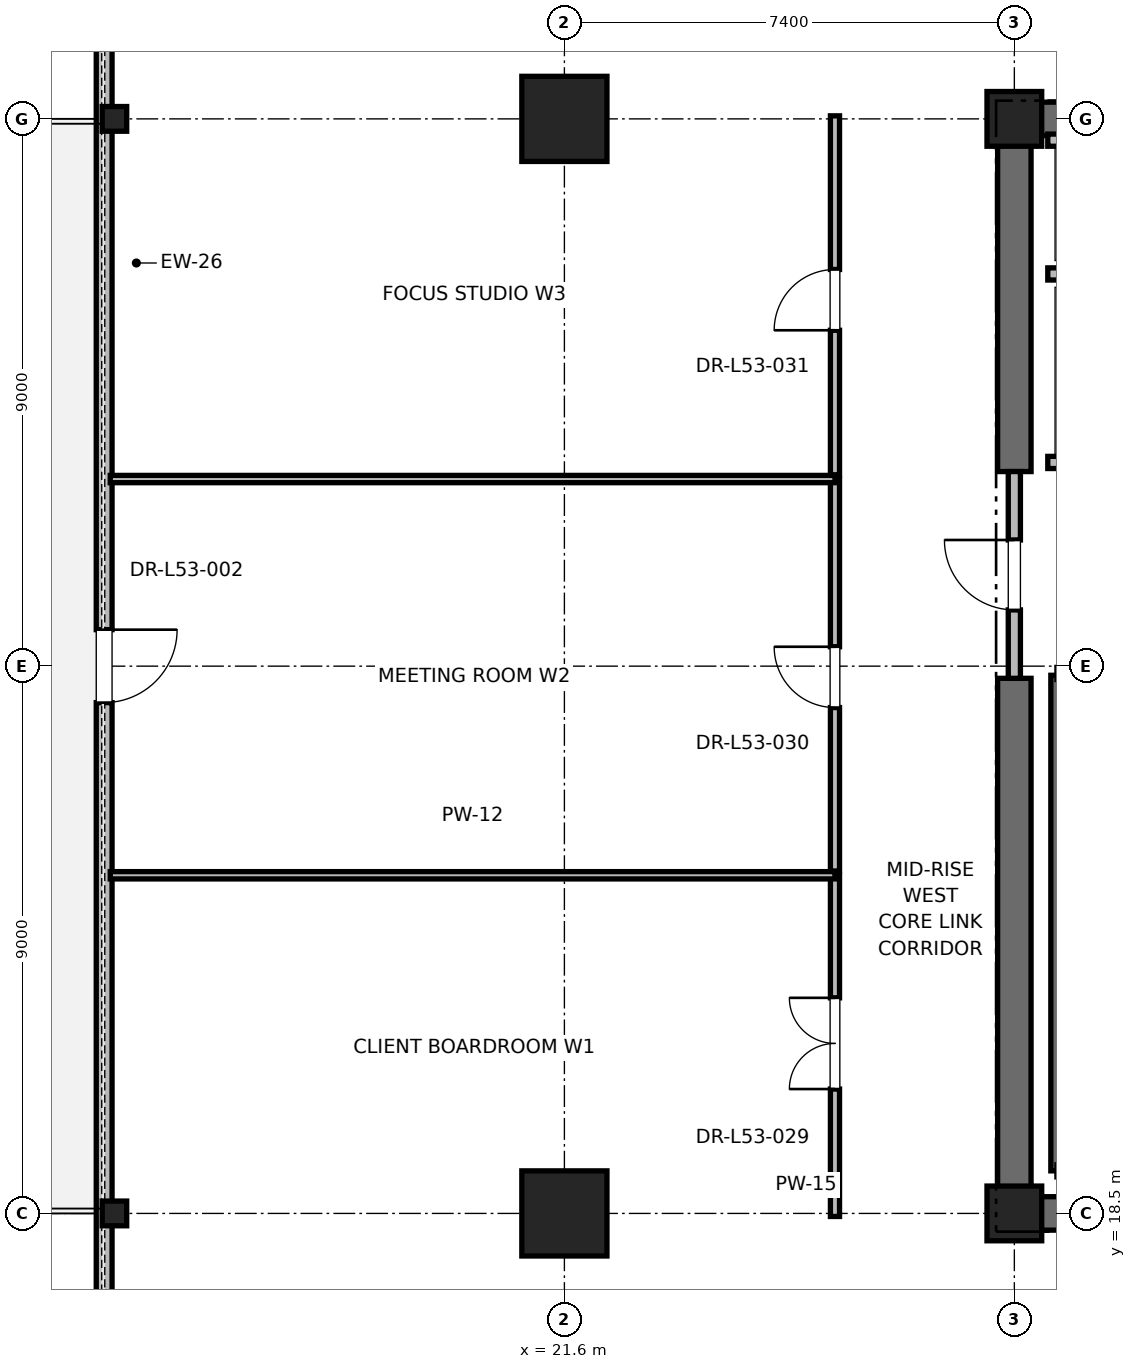
"""IFC4 building model, lengths in metres.
Left out: names, types, materials, properties, quantities, classifications, styles, units other than length and angle.
Written with IfcOpenShell. Run it as: python <this file> out.ifc"""

import sys

from ifc_helpers import new_model, si_unit, direction, frame, frame_2d, origin, origin_2d, place, context, subcontext, project, spatial, rectangle, i_section, extrude, element, fill, save


model = new_model("IFC4")
c1 = context("Model", 3, precision=1e-05, world=origin(), true_north=direction((0.0, 1.0)))
c2 = subcontext(c1, "Body", "Model", "MODEL_VIEW")
j1 = project(units=[si_unit("LENGTHUNIT", "METRE"), si_unit("PLANEANGLEUNIT", "RADIAN")], contexts=[c1])
p1 = place(None, origin())
s1 = spatial("IfcSite", under=j1, at=p1, CompositionType="ELEMENT")
p2 = place(p1, origin())
s2 = spatial("IfcBuilding", under=s1, at=p2, CompositionType="ELEMENT")
p3 = place(p2, frame((0.0, 0.0, 229.2)))
s3 = spatial("IfcBuildingStorey", under=s2, at=p3, CompositionType="ELEMENT", Elevation=229.2)
for number, where, z_axis, x_axis in (
    (1, (21.6, 18.5, 0.0), (0.0, 0.0, 1.0), (1.0, 0.0, 0.0)),
    (2, (21.6, 36.5, 0.0), (0.0, 0.0, 1.0), (1.0, 0.0, 0.0)),
):
    element("IfcColumn", number, at=place(p3, frame(where, z_axis=z_axis, x_axis=x_axis)), inside=s3, PredefinedType="COLUMN", context=c2, shape_type="SweptSolid", body=[
        extrude(rectangle(XDim=1.4, YDim=1.4, at=origin_2d()), origin(), (0.0, 0.0, 1.0), 4.0),
    ])
for number, where, z_axis, x_axis in (
    (3, (14.2, 18.5, 0.0), (0.0, 0.0, 1.0), (1.0, 0.0, 0.0)),
    (4, (14.2, 36.5, 0.0), (0.0, 0.0, 1.0), (1.0, 0.0, 0.0)),
):
    element("IfcColumn", number, at=place(p3, frame(where, z_axis=z_axis, x_axis=x_axis)), inside=s3, PredefinedType="COLUMN", context=c2, shape_type="SweptSolid", body=[
        extrude(i_section(OverallWidth=0.403, OverallDepth=0.406, WebThickness=0.027, FlangeThickness=0.043, FilletRadius=0.015, at=origin_2d()), origin(), (0.0, 0.0, 1.0), 4.0),
    ])
for number, where, z_axis, x_axis in (
    (5, (29.0, 18.5, 0.0), (0.0, 0.0, 1.0), (1.0, 0.0, 0.0)),
    (6, (29.0, 36.5, 0.0), (0.0, 0.0, 1.0), (1.0, 0.0, 0.0)),
):
    element("IfcColumn", number, at=place(p3, frame(where, z_axis=z_axis, x_axis=x_axis)), inside=s3, PredefinedType="PILASTER", context=c2, shape_type="SweptSolid", body=[
        extrude(rectangle(XDim=0.9, YDim=0.9, at=origin_2d()), origin(), (0.0, 0.0, 1.0), 4.0),
    ])
p4 = place(p3, frame((29.0, 18.5, 0.0), z_axis=(0.0, 0.0, 1.0), x_axis=(1.0, 0.0, 0.0)))
e7 = element("IfcWall", 7, at=p4, inside=s3, PredefinedType="SHEAR", context=c2, shape_type="SweptSolid", body=[
    extrude(rectangle(XDim=9.2, YDim=0.55, at=frame_2d((4.6, 0.0))), origin(), (0.0, 0.0, 1.0), 3.7),
])
p5 = place(p3, frame((29.0, 36.5, 0.0), z_axis=(0.0, 0.0, 1.0), x_axis=(1.0, 0.0, 0.0)))
e8 = element("IfcWall", 8, at=p5, inside=s3, PredefinedType="SHEAR", context=c2, shape_type="SweptSolid", body=[
    extrude(rectangle(XDim=5.8, YDim=0.55, at=frame_2d((2.9, 0.0))), origin(), (0.0, 0.0, 1.0), 3.7),
])
p6 = place(p3, frame((29.0, 18.5, 0.0), z_axis=(0.0, 0.0, 1.0), x_axis=(0.0, 1.0, 0.0)))
e9 = element("IfcWall", 9, at=p6, inside=s3, PredefinedType="SHEAR", context=c2, shape_type="SweptSolid", body=[
    extrude(rectangle(XDim=8.8, YDim=0.55, at=frame_2d((4.4, 0.0))), origin(), (0.0, 0.0, 1.0), 3.7),
])
p7 = place(p3, frame((29.0, 30.7, 0.0), z_axis=(0.0, 0.0, 1.0), x_axis=(0.0, 1.0, 0.0)))
e10 = element("IfcWall", 10, at=p7, inside=s3, PredefinedType="SHEAR", context=c2, shape_type="SweptSolid", body=[
    extrude(rectangle(XDim=5.8, YDim=0.55, at=frame_2d((2.9, 0.0))), origin(), (0.0, 0.0, 1.0), 3.7),
])
p8 = place(p3, frame((14.031, 46.36, 0.0), z_axis=(0.0, 0.0, 1.0), x_axis=(0.0, -1.0, 0.0)))
e11 = element("IfcWall", 11, at=p8, inside=s3, PredefinedType="PARAPET", context=c2, shape_type="SweptSolid", body=[
    extrude(rectangle(XDim=37.72, YDim=0.26, at=frame_2d((18.86, 0.0))), origin(), (0.0, 0.0, 1.0), 2.987),
])
p9 = place(p8, frame((4.2, 0.0, 0.85)))
e12 = element("IfcOpeningElement", 12, at=p9, cuts=e11, PredefinedType="OPENING", context=c2, shape_type="SweptSolid", body=[
    extrude(rectangle(XDim=2.0, YDim=2.3, at=frame_2d((1.0, 1.15))), frame((0.0, 0.13, 0.0), z_axis=(0.0, -1.0, 0.0), x_axis=(1.0, 0.0, 0.0)), (0.0, 0.0, 1.0), 0.26),
])
p10 = place(p8, frame((18.26, 0.0, 0.0)))
e13 = element("IfcOpeningElement", 13, at=p10, cuts=e11, PredefinedType="OPENING", context=c2, shape_type="SweptSolid", body=[
    extrude(rectangle(XDim=1.2, YDim=2.2, at=frame_2d((0.6, 1.1))), frame((0.0, 0.13, 0.0), z_axis=(0.0, -1.0, 0.0), x_axis=(1.0, 0.0, 0.0)), (0.0, 0.0, 1.0), 0.26),
])
p11 = place(p8, frame((31.52, 0.0, 0.85)))
e14 = element("IfcOpeningElement", 14, at=p11, cuts=e11, PredefinedType="OPENING", context=c2, shape_type="SweptSolid", body=[
    extrude(rectangle(XDim=2.0, YDim=2.3, at=frame_2d((1.0, 1.15))), frame((0.0, 0.13, 0.0), z_axis=(0.0, -1.0, 0.0), x_axis=(1.0, 0.0, 0.0)), (0.0, 0.0, 1.0), 0.26),
])
p12 = place(p3, frame((29.7, 19.2, 0.0), z_axis=(0.0, 0.0, 1.0), x_axis=(0.0, 1.0, 0.0)))
e15 = element("IfcWall", 15, at=p12, inside=s3, PredefinedType="SOLIDWALL", context=c2, shape_type="SweptSolid", body=[
    extrude(rectangle(XDim=8.15, YDim=0.2, at=frame_2d((4.075, 0.0))), origin(), (0.0, 0.0, 1.0), 3.7),
])
p13 = place(p3, frame((29.0, 27.3, 0.0), z_axis=(0.0, 0.0, 1.0), x_axis=(0.0, 1.0, 0.0)))
e16 = element("IfcWall", 16, at=p13, inside=s3, PredefinedType="PARTITIONING", context=c2, shape_type="SweptSolid", body=[
    extrude(rectangle(XDim=3.4, YDim=0.2, at=frame_2d((1.7, 0.0))), origin(), (0.0, 0.0, 1.0), 2.68),
])
p14 = place(p13, frame((1.125, 0.0, 0.0)))
e17 = element("IfcOpeningElement", 17, at=p14, cuts=e16, PredefinedType="OPENING", context=c2, shape_type="SweptSolid", body=[
    extrude(rectangle(XDim=1.15, YDim=2.2, at=frame_2d((0.575, 1.1))), frame((0.0, 0.1, 0.0), z_axis=(0.0, -1.0, 0.0), x_axis=(1.0, 0.0, 0.0)), (0.0, 0.0, 1.0), 0.2),
])
p15 = place(p3, frame((29.55, 30.85, 0.0), z_axis=(0.0, 0.0, 1.0), x_axis=(1.0, 0.0, 0.0)))
e18 = element("IfcWall", 18, at=p15, inside=s3, PredefinedType="SOLIDWALL", context=c2, shape_type="SweptSolid", body=[
    extrude(rectangle(XDim=2.6, YDim=0.2, at=frame_2d((1.3, 0.0))), origin(), (0.0, 0.0, 1.0), 2.68),
])
p16 = place(p15, frame((0.75, 0.0, 0.0)))
e19 = element("IfcOpeningElement", 19, at=p16, cuts=e18, PredefinedType="OPENING", context=c2, shape_type="SweptSolid", body=[
    extrude(rectangle(XDim=1.1, YDim=2.2, at=frame_2d((0.55, 1.1))), frame((0.0, 0.1, 0.0), z_axis=(0.0, -1.0, 0.0), x_axis=(1.0, 0.0, 0.0)), (0.0, 0.0, 1.0), 0.2),
])
p17 = place(p3, frame((29.55, 33.95, 0.0), z_axis=(0.0, 0.0, 1.0), x_axis=(1.0, 0.0, 0.0)))
e20 = element("IfcWall", 20, at=p17, inside=s3, PredefinedType="SOLIDWALL", context=c2, shape_type="SweptSolid", body=[
    extrude(rectangle(XDim=2.8, YDim=0.2, at=frame_2d((1.4, 0.0))), origin(), (0.0, 0.0, 1.0), 3.7),
])
p18 = place(p3, frame((32.35, 36.15, 0.0), z_axis=(0.0, 0.0, 1.0), x_axis=(-1.0, 0.0, 0.0)))
e21 = element("IfcWall", 21, at=p18, inside=s3, PredefinedType="SOLIDWALL", context=c2, shape_type="SweptSolid", body=[
    extrude(rectangle(XDim=2.8, YDim=0.2, at=frame_2d((1.4, 0.0))), origin(), (0.0, 0.0, 1.0), 2.987),
])
p19 = place(p3, frame((26.05, 18.45, 0.0), z_axis=(0.0, 0.0, 1.0), x_axis=(0.0, 1.0, 0.0)))
e22 = element("IfcWall", 22, at=p19, inside=s3, PredefinedType="PARTITIONING", context=c2, shape_type="SweptSolid", body=[
    extrude(rectangle(XDim=5.611, YDim=0.15, at=frame_2d((2.806, 0.0))), origin(), (0.0, 0.0, 1.0), 2.85),
])
p20 = place(p19, frame((2.095, 0.0, 0.0)))
e23 = element("IfcOpeningElement", 23, at=p20, cuts=e22, PredefinedType="OPENING", context=c2, shape_type="SweptSolid", body=[
    extrude(rectangle(XDim=1.5, YDim=2.25, at=frame_2d((0.75, 1.125))), frame((0.0, 0.075, 0.0), z_axis=(0.0, -1.0, 0.0), x_axis=(1.0, 0.0, 0.0)), (0.0, 0.0, 1.0), 0.15),
])
p21 = place(p3, frame((14.131, 24.061, 0.0), z_axis=(0.0, 0.0, 1.0), x_axis=(1.0, 0.0, 0.0)))
e24 = element("IfcWall", 24, at=p21, inside=s3, PredefinedType="PARTITIONING", context=c2, shape_type="SweptSolid", body=[
    extrude(rectangle(XDim=11.919, YDim=0.12, at=frame_2d((5.96, 0.0))), origin(), (0.0, 0.0, 1.0), 2.85),
])
p22 = place(p3, frame((26.05, 24.131, 0.0), z_axis=(0.0, 0.0, 1.0), x_axis=(0.0, 1.0, 0.0)))
e25 = element("IfcWall", 25, at=p22, inside=s3, PredefinedType="PARTITIONING", context=c2, shape_type="SweptSolid", body=[
    extrude(rectangle(XDim=6.446, YDim=0.15, at=frame_2d((3.223, 0.0))), origin(), (0.0, 0.0, 1.0), 2.85),
])
p23 = place(p22, frame((2.688, 0.0, 0.0)))
e26 = element("IfcOpeningElement", 26, at=p23, cuts=e25, PredefinedType="OPENING", context=c2, shape_type="SweptSolid", body=[
    extrude(rectangle(XDim=1.0, YDim=2.15, at=frame_2d((0.5, 1.075))), frame((0.0, 0.075, 0.0), z_axis=(0.0, -1.0, 0.0), x_axis=(1.0, 0.0, 0.0)), (0.0, 0.0, 1.0), 0.15),
])
p24 = place(p3, frame((14.131, 30.577, 0.0), z_axis=(0.0, 0.0, 1.0), x_axis=(1.0, 0.0, 0.0)))
e27 = element("IfcWall", 27, at=p24, inside=s3, PredefinedType="PARTITIONING", context=c2, shape_type="SweptSolid", body=[
    extrude(rectangle(XDim=11.919, YDim=0.12, at=frame_2d((5.96, 0.0))), origin(), (0.0, 0.0, 1.0), 2.85),
])
p25 = place(p3, frame((26.05, 30.647, 0.0), z_axis=(0.0, 0.0, 1.0), x_axis=(0.0, 1.0, 0.0)))
e28 = element("IfcWall", 28, at=p25, inside=s3, PredefinedType="PARTITIONING", context=c2, shape_type="SweptSolid", body=[
    extrude(rectangle(XDim=5.903, YDim=0.15, at=frame_2d((2.952, 0.0))), origin(), (0.0, 0.0, 1.0), 2.85),
])
p26 = place(p25, frame((2.376, 0.0, 0.0)))
e29 = element("IfcOpeningElement", 29, at=p26, cuts=e28, PredefinedType="OPENING", context=c2, shape_type="SweptSolid", body=[
    extrude(rectangle(XDim=1.0, YDim=2.15, at=frame_2d((0.5, 1.075))), frame((0.0, 0.075, 0.0), z_axis=(0.0, -1.0, 0.0), x_axis=(1.0, 0.0, 0.0)), (0.0, 0.0, 1.0), 0.15),
])
p27 = place(p10, origin())
e30 = element("IfcDoor", 30, at=p27, inside=s3, OperationType="SINGLE_SWING_LEFT", PredefinedType="DOOR", context=c2, shape_type="SweptSolid", body=[
    extrude(rectangle(XDim=1.2, YDim=2.2, at=frame_2d((0.6, 1.1))), frame((0.0, 0.025, 0.0), z_axis=(0.0, -1.0, 0.0), x_axis=(1.0, 0.0, 0.0)), (0.0, 0.0, 1.0), 0.05),
])
fill(e13, e30)
p28 = place(p14, origin())
e31 = element("IfcDoor", 31, at=p28, inside=s3, OperationType="SINGLE_SWING_RIGHT", PredefinedType="DOOR", context=c2, shape_type="SweptSolid", body=[
    extrude(rectangle(XDim=1.15, YDim=2.2, at=frame_2d((0.575, 1.1))), frame((0.0, 0.025, 0.0), z_axis=(0.0, -1.0, 0.0), x_axis=(1.0, 0.0, 0.0)), (0.0, 0.0, 1.0), 0.05),
])
fill(e17, e31)
p29 = place(p20, origin())
e32 = element("IfcDoor", 32, at=p29, inside=s3, OperationType="DOUBLE_DOOR_SINGLE_SWING", PredefinedType="DOOR", context=c2, shape_type="SweptSolid", body=[
    extrude(rectangle(XDim=1.5, YDim=2.25, at=frame_2d((0.75, 1.125))), frame((0.0, 0.025, 0.0), z_axis=(0.0, -1.0, 0.0), x_axis=(1.0, 0.0, 0.0)), (0.0, 0.0, 1.0), 0.05),
])
fill(e23, e32)
p30 = place(p23, origin())
e33 = element("IfcDoor", 33, at=p30, inside=s3, OperationType="SINGLE_SWING_RIGHT", PredefinedType="DOOR", context=c2, shape_type="SweptSolid", body=[
    extrude(rectangle(XDim=1.0, YDim=2.15, at=frame_2d((0.5, 1.075))), frame((0.0, 0.025, 0.0), z_axis=(0.0, -1.0, 0.0), x_axis=(1.0, 0.0, 0.0)), (0.0, 0.0, 1.0), 0.05),
])
fill(e26, e33)
p31 = place(p26, origin())
e34 = element("IfcDoor", 34, at=p31, inside=s3, OperationType="SINGLE_SWING_LEFT", PredefinedType="DOOR", context=c2, shape_type="SweptSolid", body=[
    extrude(rectangle(XDim=1.0, YDim=2.15, at=frame_2d((0.5, 1.075))), frame((0.0, 0.025, 0.0), z_axis=(0.0, -1.0, 0.0), x_axis=(1.0, 0.0, 0.0)), (0.0, 0.0, 1.0), 0.05),
])
fill(e29, e34)
save(model, sys.argv[1])
